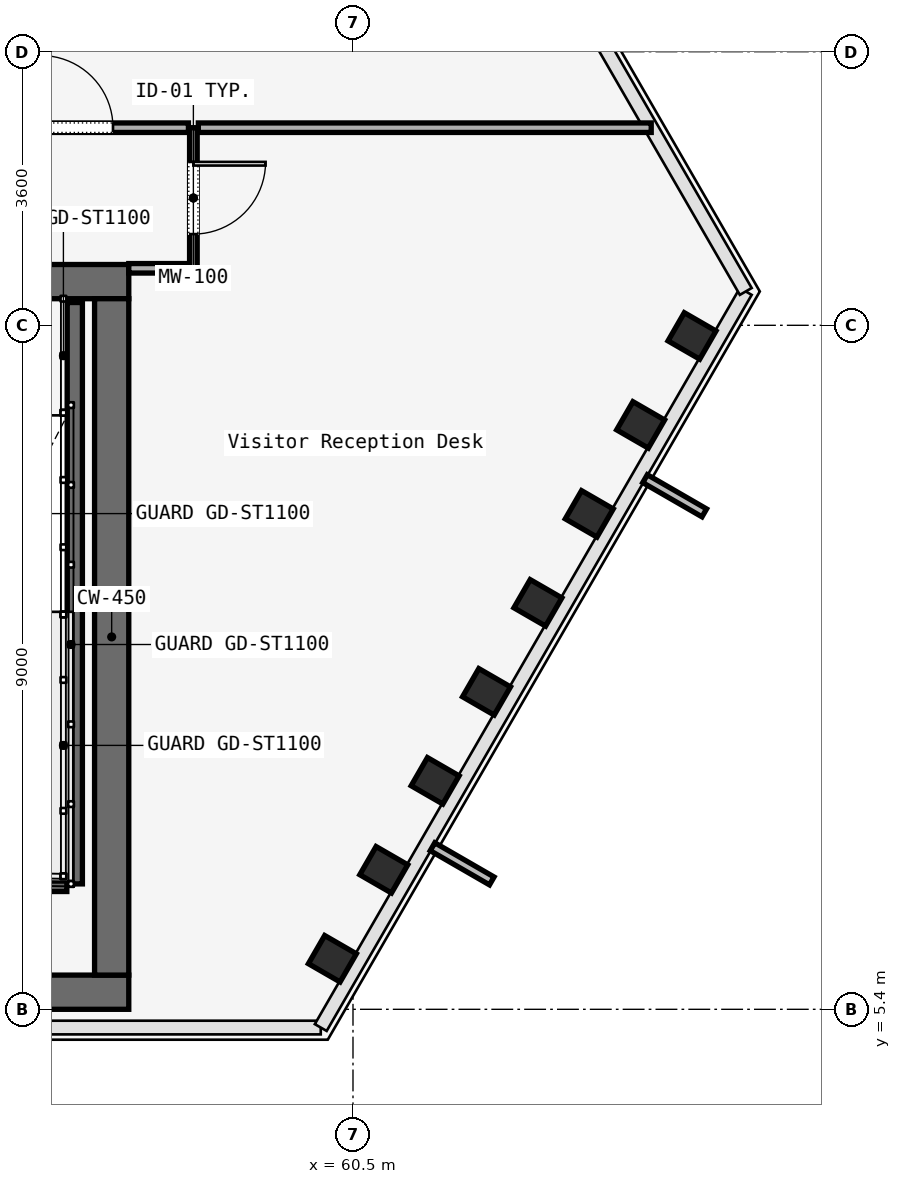
"""IFC4 building model, lengths in metres.
Left out: names, types, materials, properties, quantities, classifications, styles, units other than length and angle.
Written with IfcOpenShell. Run it as: python <this file> out.ifc"""

import sys

from ifc_helpers import new_model, si_unit, direction, frame, frame_2d, origin, origin_2d, place, context, subcontext, project, spatial, rectangle, i_section, extrude, element, fill, save


model = new_model("IFC4")
c1 = context("Model", 3, precision=1e-05, world=origin(), true_north=direction((0.0, 1.0)))
c2 = subcontext(c1, "Body", "Model", "MODEL_VIEW")
j1 = project(units=[si_unit("LENGTHUNIT", "METRE"), si_unit("PLANEANGLEUNIT", "RADIAN")], contexts=[c1])
p1 = place(None, origin())
s1 = spatial("IfcSite", under=j1, at=p1, CompositionType="ELEMENT")
p2 = place(p1, origin())
s2 = spatial("IfcBuilding", under=s1, at=p2, CompositionType="ELEMENT")
p3 = place(p2, frame((0.0, 0.0, 157.4)))
s3 = spatial("IfcBuildingStorey", under=s2, at=p3, CompositionType="ELEMENT", Elevation=157.4)
p4 = place(p3, frame((26.45, 14.975, 0.0), z_axis=(0.0, 0.0, 1.0), x_axis=(1.0, 0.0, 0.0)))
e1 = element("IfcWall", 1, at=p4, inside=s3, PredefinedType="SOLIDWALL", context=c2, shape_type="SweptSolid", body=[
    extrude(rectangle(XDim=31.1, YDim=0.45, at=frame_2d((15.55, 0.0))), origin(), (0.0, 0.0, 1.0), 3.58),
])
p5 = place(p4, frame((1.65, 0.0, 0.0)))
e2 = element("IfcOpeningElement", 2, at=p5, cuts=e1, PredefinedType="OPENING", context=c2, shape_type="SweptSolid", body=[
    extrude(rectangle(XDim=1.1, YDim=2.2, at=frame_2d((0.55, 1.1))), frame((0.0, 0.225, 0.0), z_axis=(0.0, -1.0, 0.0), x_axis=(1.0, 0.0, 0.0)), (0.0, 0.0, 1.0), 0.45),
])
p6 = place(p4, frame((13.65, 0.0, 0.0)))
e3 = element("IfcOpeningElement", 3, at=p6, cuts=e1, PredefinedType="OPENING", context=c2, shape_type="SweptSolid", body=[
    extrude(rectangle(XDim=1.1, YDim=2.2, at=frame_2d((0.55, 1.1))), frame((0.0, 0.225, 0.0), z_axis=(0.0, -1.0, 0.0), x_axis=(1.0, 0.0, 0.0)), (0.0, 0.0, 1.0), 0.45),
])
p7 = place(p4, frame((25.55, 0.0, 0.0)))
e4 = element("IfcOpeningElement", 4, at=p7, cuts=e1, PredefinedType="OPENING", context=c2, shape_type="SweptSolid", body=[
    extrude(rectangle(XDim=1.1, YDim=2.2, at=frame_2d((0.55, 1.1))), frame((0.0, 0.225, 0.0), z_axis=(0.0, -1.0, 0.0), x_axis=(1.0, 0.0, 0.0)), (0.0, 0.0, 1.0), 0.45),
])
p8 = place(p4, frame((10.7, 0.0, 0.0)))
e5 = element("IfcOpeningElement", 5, at=p8, cuts=e1, PredefinedType="OPENING", context=c2, shape_type="SweptSolid", body=[
    extrude(rectangle(XDim=1.4, YDim=2.2, at=frame_2d((0.7, 1.1))), frame((0.0, 0.225, 0.0), z_axis=(0.0, -1.0, 0.0), x_axis=(1.0, 0.0, 0.0)), (0.0, 0.0, 1.0), 0.45),
])
p9 = place(p4, frame((19.35, 0.0, 0.0)))
e6 = element("IfcOpeningElement", 6, at=p9, cuts=e1, PredefinedType="OPENING", context=c2, shape_type="SweptSolid", body=[
    extrude(rectangle(XDim=1.1, YDim=2.2, at=frame_2d((0.55, 1.1))), frame((0.0, 0.225, 0.0), z_axis=(0.0, -1.0, 0.0), x_axis=(1.0, 0.0, 0.0)), (0.0, 0.0, 1.0), 0.45),
])
p10 = place(p4, frame((21.4, 0.0, 0.0)))
e7 = element("IfcOpeningElement", 7, at=p10, cuts=e1, PredefinedType="OPENING", context=c2, shape_type="SweptSolid", body=[
    extrude(rectangle(XDim=0.9, YDim=2.1, at=frame_2d((0.45, 1.05))), frame((0.0, 0.225, 0.0), z_axis=(0.0, -1.0, 0.0), x_axis=(1.0, 0.0, 0.0)), (0.0, 0.0, 1.0), 0.45),
])
p11 = place(p4, frame((23.35, 0.0, 0.0)))
e8 = element("IfcOpeningElement", 8, at=p11, cuts=e1, PredefinedType="OPENING", context=c2, shape_type="SweptSolid", body=[
    extrude(rectangle(XDim=1.3, YDim=2.3, at=frame_2d((0.65, 1.15))), frame((0.0, 0.225, 0.0), z_axis=(0.0, -1.0, 0.0), x_axis=(1.0, 0.0, 0.0)), (0.0, 0.0, 1.0), 0.45),
])
p12 = place(p3, frame((26.45, 5.625, 0.0), z_axis=(0.0, 0.0, 1.0), x_axis=(1.0, 0.0, 0.0)))
e9 = element("IfcWall", 9, at=p12, inside=s3, PredefinedType="SOLIDWALL", context=c2, shape_type="SweptSolid", body=[
    extrude(rectangle(XDim=31.1, YDim=0.45, at=frame_2d((15.55, 0.0))), origin(), (0.0, 0.0, 1.0), 3.58),
])
p13 = place(p3, frame((57.325, 5.85, 0.0), z_axis=(0.0, 0.0, 1.0), x_axis=(0.0, 1.0, 0.0)))
e10 = element("IfcWall", 10, at=p13, inside=s3, PredefinedType="SOLIDWALL", context=c2, shape_type="SweptSolid", body=[
    extrude(rectangle(XDim=8.9, YDim=0.45, at=frame_2d((4.45, 0.0))), origin(), (0.0, 0.0, 1.0), 3.58),
])
p14 = place(p3, frame((60.229, 6.065, 0.0), z_axis=(0.082637441478, -0.008630719628, 0.996542304142), x_axis=(-0.80642429623, 0.586943163695, 0.071955382297)))
e11 = element("IfcColumn", 11, at=p14, inside=s3, PredefinedType="COLUMN", context=c2, shape_type="SweptSolid", body=[
    extrude(i_section(OverallWidth=0.428, OverallDepth=0.481, WebThickness=0.051, FlangeThickness=0.065, FilletRadius=0.015, at=origin_2d()), origin(), (0.0, 0.0, 1.0), 3.593),
])
p15 = place(p3, frame((60.905, 7.236, 0.0), z_axis=(0.072682152579, -0.02597248109, 0.997016918072), x_axis=(-0.64483596094, 0.761392562789, 0.066842716942)))
e12 = element("IfcColumn", 12, at=p15, inside=s3, PredefinedType="COLUMN", context=c2, shape_type="SweptSolid", body=[
    extrude(i_section(OverallWidth=0.428, OverallDepth=0.481, WebThickness=0.051, FlangeThickness=0.065, FilletRadius=0.015, at=origin_2d()), origin(), (0.0, 0.0, 1.0), 3.591),
])
p16 = place(p3, frame((61.581, 8.407, 0.0), z_axis=(0.062692448917, -0.043245550446, 0.99709552161), x_axis=(-0.4268946115, 0.901892787466, 0.065957490769)))
e13 = element("IfcColumn", 13, at=p16, inside=s3, PredefinedType="COLUMN", context=c2, shape_type="SweptSolid", body=[
    extrude(i_section(OverallWidth=0.428, OverallDepth=0.481, WebThickness=0.051, FlangeThickness=0.065, FilletRadius=0.015, at=origin_2d()), origin(), (0.0, 0.0, 1.0), 3.591),
])
p17 = place(p3, frame((62.257, 9.577, 0.0), z_axis=(0.052679977331, -0.06056498039, 0.996773145274), x_axis=(-0.189267023652, 0.979461852811, 0.06951598842)))
e14 = element("IfcColumn", 14, at=p17, inside=s3, PredefinedType="COLUMN", context=c2, shape_type="SweptSolid", body=[
    extrude(i_section(OverallWidth=0.428, OverallDepth=0.481, WebThickness=0.051, FlangeThickness=0.065, FilletRadius=0.015, at=origin_2d()), origin(), (0.0, 0.0, 1.0), 3.592),
])
p18 = place(p3, frame((62.933, 10.748, 0.0), z_axis=(0.042657147183, -0.077774575675, 0.996057971793), x_axis=(0.023569695175, 0.996766312557, 0.076820489587)))
e15 = element("IfcColumn", 15, at=p18, inside=s3, PredefinedType="COLUMN", context=c2, shape_type="SweptSolid", body=[
    extrude(i_section(OverallWidth=0.428, OverallDepth=0.481, WebThickness=0.051, FlangeThickness=0.065, FilletRadius=0.015, at=origin_2d()), origin(), (0.0, 0.0, 1.0), 3.594),
])
p19 = place(p3, frame((63.608, 11.919, 0.0), z_axis=(0.032635548497, -0.094989122444, 0.994943208224), x_axis=(0.192895682361, 0.977356253584, 0.086982810407)))
e16 = element("IfcColumn", 16, at=p19, inside=s3, PredefinedType="COLUMN", context=c2, shape_type="SweptSolid", body=[
    extrude(i_section(OverallWidth=0.428, OverallDepth=0.481, WebThickness=0.051, FlangeThickness=0.065, FilletRadius=0.015, at=origin_2d()), origin(), (0.0, 0.0, 1.0), 3.598),
])
p20 = place(p3, frame((64.284, 13.089, 0.0), z_axis=(0.022627554317, -0.112053816885, 0.993444480536), x_axis=(0.319810446027, 0.942295192889, 0.099000242776)))
e17 = element("IfcColumn", 17, at=p20, inside=s3, PredefinedType="COLUMN", context=c2, shape_type="SweptSolid", body=[
    extrude(i_section(OverallWidth=0.428, OverallDepth=0.481, WebThickness=0.051, FlangeThickness=0.065, FilletRadius=0.015, at=origin_2d()), origin(), (0.0, 0.0, 1.0), 3.604),
])
p21 = place(p3, frame((64.96, 14.26, 0.0), z_axis=(0.012644712092, -0.129016634603, 0.991561808084), x_axis=(0.413855538936, 0.903393439942, 0.112267027934)))
e18 = element("IfcColumn", 18, at=p21, inside=s3, PredefinedType="COLUMN", context=c2, shape_type="SweptSolid", body=[
    extrude(i_section(OverallWidth=0.428, OverallDepth=0.481, WebThickness=0.051, FlangeThickness=0.065, FilletRadius=0.015, at=origin_2d()), origin(), (0.0, 0.0, 1.0), 3.611),
])
p22 = place(p3, frame((56.84, 14.7, 0.0), z_axis=(0.0, 0.0, 1.0), x_axis=(0.0, -1.0, 0.0)))
e19 = element("IfcWall", 19, at=p22, inside=s3, PredefinedType="SOLIDWALL", context=c2, shape_type="SweptSolid", body=[
    extrude(rectangle(XDim=7.65, YDim=0.2, at=frame_2d((3.825, 0.0))), origin(), (0.0, 0.0, 1.0), 3.8),
])
p23 = place(p3, frame((53.62, 7.05, 0.0), z_axis=(0.0, 0.0, 1.0), x_axis=(1.0, 0.0, 0.0)))
e20 = element("IfcWall", 20, at=p23, inside=s3, PredefinedType="SOLIDWALL", context=c2, shape_type="SweptSolid", body=[
    extrude(rectangle(XDim=3.115, YDim=0.2, at=frame_2d((1.558, 0.0))), origin(), (0.0, 0.0, 1.0), 3.8),
])
p24 = place(p3, frame((58.4, 17.0, 0.0), z_axis=(0.0, 0.0, 1.0), x_axis=(0.0, -1.0, 0.0)))
e21 = element("IfcWall", 21, at=p24, inside=s3, PredefinedType="MOVABLE", context=c2, shape_type="SweptSolid", body=[
    extrude(rectangle(XDim=1.85, YDim=0.1, at=frame_2d((0.925, 0.0))), origin(), (0.0, 0.0, 1.0), 3.01),
])
p25 = place(p24, frame((0.45, 0.0, 0.0)))
e22 = element("IfcOpeningElement", 22, at=p25, cuts=e21, PredefinedType="OPENING", context=c2, shape_type="SweptSolid", body=[
    extrude(rectangle(XDim=0.95, YDim=2.2, at=frame_2d((0.475, 1.1))), frame((0.0, 0.05, 0.0), z_axis=(0.0, -1.0, 0.0), x_axis=(1.0, 0.0, 0.0)), (0.0, 0.0, 1.0), 0.1),
])
p26 = place(p3, frame((58.335, 15.15, 0.0), z_axis=(0.0, 0.0, 1.0), x_axis=(-1.0, 0.0, 0.0)))
e23 = element("IfcWall", 23, at=p26, inside=s3, PredefinedType="PARTITIONING", context=c2, shape_type="SweptSolid", body=[
    extrude(rectangle(XDim=0.785, YDim=0.125, at=frame_2d((0.393, 0.0))), origin(), (0.0, 0.0, 1.0), 3.01),
])
p27 = place(p3, frame((55.4, 17.0, 0.0), z_axis=(0.0, 0.0, 1.0), x_axis=(1.0, 0.0, 0.0)))
e24 = element("IfcWall", 24, at=p27, inside=s3, PredefinedType="PARTITIONING", context=c2, shape_type="SweptSolid", body=[
    extrude(rectangle(XDim=2.935, YDim=0.125, at=frame_2d((1.468, 0.0))), origin(), (0.0, 0.0, 1.0), 3.01),
])
p28 = place(p27, frame((0.992, 0.0, 0.0)))
e25 = element("IfcOpeningElement", 25, at=p28, cuts=e24, PredefinedType="OPENING", context=c2, shape_type="SweptSolid", body=[
    extrude(rectangle(XDim=0.95, YDim=2.2, at=frame_2d((0.475, 1.1))), frame((0.0, 0.062, 0.0), z_axis=(0.0, -1.0, 0.0), x_axis=(1.0, 0.0, 0.0)), (0.0, 0.0, 1.0), 0.125),
])
p29 = place(p3, frame((58.465, 17.0, 0.0), z_axis=(0.0, 0.0, 1.0), x_axis=(1.0, 0.0, 0.0)))
e26 = element("IfcWall", 26, at=p29, inside=s3, PredefinedType="PARTITIONING", context=c2, shape_type="SweptSolid", body=[
    extrude(rectangle(XDim=5.959, YDim=0.125, at=frame_2d((2.979, 0.0))), origin(), (0.0, 0.0, 1.0), 3.01),
])
p30 = place(p25, origin())
e27 = element("IfcDoor", 27, at=p30, inside=s3, OperationType="SINGLE_SWING_LEFT", PredefinedType="DOOR", context=c2, shape_type="SweptSolid", body=[
    extrude(rectangle(XDim=0.95, YDim=2.2, at=frame_2d((0.475, 1.1))), frame((0.0, 0.025, 0.0), z_axis=(0.0, -1.0, 0.0), x_axis=(1.0, 0.0, 0.0)), (0.0, 0.0, 1.0), 0.05),
])
fill(e22, e27)
p31 = place(p28, origin())
e28 = element("IfcDoor", 28, at=p31, inside=s3, OperationType="SINGLE_SWING_LEFT", PredefinedType="DOOR", context=c2, shape_type="SweptSolid", body=[
    extrude(rectangle(XDim=0.95, YDim=2.2, at=frame_2d((0.475, 1.1))), frame((0.0, 0.025, 0.0), z_axis=(0.0, -1.0, 0.0), x_axis=(1.0, 0.0, 0.0)), (0.0, 0.0, 1.0), 0.05),
])
fill(e25, e28)
save(model, sys.argv[1])
